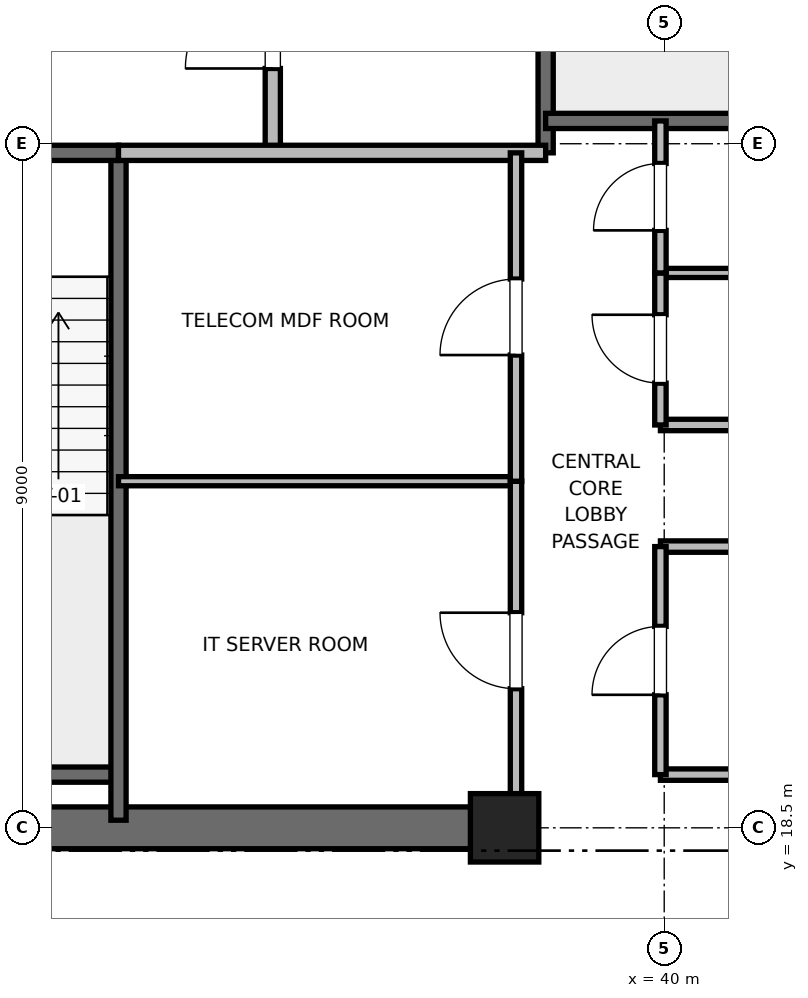
"""IFC4 building model, lengths in metres.
Left out: names, types, materials, properties, quantities, classifications, styles, units other than length and angle.
Written with IfcOpenShell. Run it as: python <this file> out.ifc"""

import sys

from ifc_helpers import new_model, si_unit, direction, frame, frame_2d, origin, origin_2d, place, context, subcontext, project, spatial, rectangle, extrude, element, fill, save


model = new_model("IFC4")
c1 = context("Model", 3, precision=1e-05, world=origin(), true_north=direction((0.0, 1.0)))
c2 = subcontext(c1, "Body", "Model", "MODEL_VIEW")
j1 = project(units=[si_unit("LENGTHUNIT", "METRE"), si_unit("PLANEANGLEUNIT", "RADIAN")], contexts=[c1])
p1 = place(None, origin())
s1 = spatial("IfcSite", under=j1, at=p1, CompositionType="ELEMENT")
p2 = place(p1, origin())
s2 = spatial("IfcBuilding", under=s1, at=p2, CompositionType="ELEMENT")
p3 = place(p2, frame((0.0, 0.0, 205.2)))
s3 = spatial("IfcBuildingStorey", under=s2, at=p3, CompositionType="ELEMENT", Elevation=205.2)
p4 = place(p3, frame((37.9, 18.5, 0.0), z_axis=(0.0, 0.0, 1.0), x_axis=(1.0, 0.0, 0.0)))
e1 = element("IfcColumn", 1, at=p4, inside=s3, PredefinedType="PILASTER", context=c2, shape_type="SweptSolid", body=[
    extrude(rectangle(XDim=0.9, YDim=0.9, at=origin_2d()), origin(), (0.0, 0.0, 1.0), 4.0),
])
p5 = place(p3, frame((29.0, 18.5, 0.0), z_axis=(0.0, 0.0, 1.0), x_axis=(1.0, 0.0, 0.0)))
e2 = element("IfcWall", 2, at=p5, inside=s3, PredefinedType="SHEAR", context=c2, shape_type="SweptSolid", body=[
    extrude(rectangle(XDim=9.2, YDim=0.55, at=frame_2d((4.6, 0.0))), origin(), (0.0, 0.0, 1.0), 3.775),
])
p6 = place(p3, frame((29.7, 19.2, 0.0), z_axis=(0.0, 0.0, 1.0), x_axis=(1.0, 0.0, 0.0)))
e3 = element("IfcWall", 3, at=p6, inside=s3, PredefinedType="SOLIDWALL", context=c2, shape_type="SweptSolid", body=[
    extrude(rectangle(XDim=3.12, YDim=0.2, at=frame_2d((1.56, 0.0))), origin(), (0.0, 0.0, 1.0), 3.775),
])
p7 = place(p3, frame((32.82, 18.6, 0.0), z_axis=(0.0, 0.0, 1.0), x_axis=(0.0, 1.0, 0.0)))
e4 = element("IfcWall", 4, at=p7, inside=s3, PredefinedType="SOLIDWALL", context=c2, shape_type="SweptSolid", body=[
    extrude(rectangle(XDim=8.78, YDim=0.2, at=frame_2d((4.39, 0.0))), origin(), (0.0, 0.0, 1.0), 3.775),
])
p8 = place(p3, frame((29.7, 27.38, 0.0), z_axis=(0.0, 0.0, 1.0), x_axis=(1.0, 0.0, 0.0)))
e5 = element("IfcWall", 5, at=p8, inside=s3, PredefinedType="SOLIDWALL", context=c2, shape_type="SweptSolid", body=[
    extrude(rectangle(XDim=3.12, YDim=0.2, at=frame_2d((1.56, 0.0))), origin(), (0.0, 0.0, 1.0), 3.775),
])
p9 = place(p8, frame((1.01, 0.0, 0.0)))
e6 = element("IfcOpeningElement", 6, at=p9, cuts=e5, PredefinedType="OPENING", context=c2, shape_type="SweptSolid", body=[
    extrude(rectangle(XDim=1.1, YDim=2.15, at=frame_2d((0.55, 1.075))), frame((0.0, 0.1, 0.0), z_axis=(0.0, -1.0, 0.0), x_axis=(1.0, 0.0, 0.0)), (0.0, 0.0, 1.0), 0.2),
])
p10 = place(p3, frame((38.44, 27.38, 0.0), z_axis=(0.0, 0.0, 1.0), x_axis=(0.0, 1.0, 0.0)))
e7 = element("IfcWall", 7, at=p10, inside=s3, PredefinedType="SOLIDWALL", context=c2, shape_type="SweptSolid", body=[
    extrude(rectangle(XDim=8.87, YDim=0.2, at=frame_2d((4.435, 0.0))), origin(), (0.0, 0.0, 1.0), 3.775),
])
p11 = place(p3, frame((38.44, 27.8, 0.0), z_axis=(0.0, 0.0, 1.0), x_axis=(1.0, 0.0, 0.0)))
e8 = element("IfcWall", 8, at=p11, inside=s3, PredefinedType="SOLIDWALL", context=c2, shape_type="SweptSolid", body=[
    extrude(rectangle(XDim=3.32, YDim=0.2, at=frame_2d((1.66, 0.0))), origin(), (0.0, 0.0, 1.0), 3.775),
])
p12 = place(p3, frame((34.85, 27.38, 0.0), z_axis=(0.0, 0.0, 1.0), x_axis=(0.0, 1.0, 0.0)))
e9 = element("IfcWall", 9, at=p12, inside=s3, PredefinedType="PARTITIONING", context=c2, shape_type="SweptSolid", body=[
    extrude(rectangle(XDim=3.37, YDim=0.2, at=frame_2d((1.685, 0.0))), origin(), (0.0, 0.0, 1.0), 3.775),
])
p13 = place(p12, frame((1.11, 0.0, 0.0)))
e10 = element("IfcOpeningElement", 10, at=p13, cuts=e9, PredefinedType="OPENING", context=c2, shape_type="SweptSolid", body=[
    extrude(rectangle(XDim=1.15, YDim=2.2, at=frame_2d((0.575, 1.1))), frame((0.0, 0.1, 0.0), z_axis=(0.0, -1.0, 0.0), x_axis=(1.0, 0.0, 0.0)), (0.0, 0.0, 1.0), 0.2),
])
p14 = place(p3, frame((32.82, 27.38, 0.0), z_axis=(0.0, 0.0, 1.0), x_axis=(1.0, 0.0, 0.0)))
e11 = element("IfcWall", 11, at=p14, inside=s3, PredefinedType="PARTITIONING", context=c2, shape_type="SweptSolid", body=[
    extrude(rectangle(XDim=5.62, YDim=0.2, at=frame_2d((2.81, 0.0))), origin(), (0.0, 0.0, 1.0), 3.775),
])
for number, where, z_axis, x_axis in (
    (12, (39.95, 19.2, 0.0), (0.0, 0.0, 1.0), (1.0, 0.0, 0.0)),
    (13, (39.95, 22.2, 0.0), (0.0, 0.0, 1.0), (1.0, 0.0, 0.0)),
    (14, (39.95, 23.8, 0.0), (0.0, 0.0, 1.0), (1.0, 0.0, 0.0)),
):
    element("IfcWall", number, at=place(p3, frame(where, z_axis=z_axis, x_axis=x_axis)), inside=s3, PredefinedType="PARTITIONING", context=c2, shape_type="SweptSolid", body=[
        extrude(rectangle(XDim=1.81, YDim=0.15, at=frame_2d((0.905, 0.0))), origin(), (0.0, 0.0, 1.0), 2.85),
    ])
p15 = place(p3, frame((39.95, 25.8, 0.0), z_axis=(0.0, 0.0, 1.0), x_axis=(1.0, 0.0, 0.0)))
e15 = element("IfcWall", 15, at=p15, inside=s3, PredefinedType="PARTITIONING", context=c2, shape_type="SweptSolid", body=[
    extrude(rectangle(XDim=1.81, YDim=0.12, at=frame_2d((0.905, 0.0))), origin(), (0.0, 0.0, 1.0), 2.85),
])
p16 = place(p3, frame((39.95, 19.2, 0.0), z_axis=(0.0, 0.0, 1.0), x_axis=(0.0, 1.0, 0.0)))
e16 = element("IfcWall", 16, at=p16, inside=s3, PredefinedType="PARTITIONING", context=c2, shape_type="SweptSolid", body=[
    extrude(rectangle(XDim=3.0, YDim=0.15, at=frame_2d((1.5, 0.0))), origin(), (0.0, 0.0, 1.0), 2.85),
])
p17 = place(p16, frame((1.05, 0.0, 0.0)))
e17 = element("IfcOpeningElement", 17, at=p17, cuts=e16, PredefinedType="OPENING", context=c2, shape_type="SweptSolid", body=[
    extrude(rectangle(XDim=0.9, YDim=2.1, at=frame_2d((0.45, 1.05))), frame((0.0, 0.075, 0.0), z_axis=(0.0, -1.0, 0.0), x_axis=(1.0, 0.0, 0.0)), (0.0, 0.0, 1.0), 0.15),
])
p18 = place(p3, frame((39.95, 23.8, 0.0), z_axis=(0.0, 0.0, 1.0), x_axis=(0.0, 1.0, 0.0)))
e18 = element("IfcWall", 18, at=p18, inside=s3, PredefinedType="PARTITIONING", context=c2, shape_type="SweptSolid", body=[
    extrude(rectangle(XDim=2.0, YDim=0.15, at=frame_2d((1.0, 0.0))), origin(), (0.0, 0.0, 1.0), 2.85),
])
p19 = place(p18, frame((0.55, 0.0, 0.0)))
e19 = element("IfcOpeningElement", 19, at=p19, cuts=e18, PredefinedType="OPENING", context=c2, shape_type="SweptSolid", body=[
    extrude(rectangle(XDim=0.9, YDim=2.1, at=frame_2d((0.45, 1.05))), frame((0.0, 0.075, 0.0), z_axis=(0.0, -1.0, 0.0), x_axis=(1.0, 0.0, 0.0)), (0.0, 0.0, 1.0), 0.15),
])
p20 = place(p3, frame((39.95, 25.8, 0.0), z_axis=(0.0, 0.0, 1.0), x_axis=(0.0, 1.0, 0.0)))
e20 = element("IfcWall", 20, at=p20, inside=s3, PredefinedType="PARTITIONING", context=c2, shape_type="SweptSolid", body=[
    extrude(rectangle(XDim=2.0, YDim=0.15, at=frame_2d((1.0, 0.0))), origin(), (0.0, 0.0, 1.0), 2.85),
])
p21 = place(p20, frame((0.56, 0.0, 0.0)))
e21 = element("IfcOpeningElement", 21, at=p21, cuts=e20, PredefinedType="OPENING", context=c2, shape_type="SweptSolid", body=[
    extrude(rectangle(XDim=0.88, YDim=2.1, at=frame_2d((0.44, 1.05))), frame((0.0, 0.075, 0.0), z_axis=(0.0, -1.0, 0.0), x_axis=(1.0, 0.0, 0.0)), (0.0, 0.0, 1.0), 0.15),
])
p22 = place(p3, frame((32.82, 23.06, 0.0), z_axis=(0.0, 0.0, 1.0), x_axis=(1.0, 0.0, 0.0)))
e22 = element("IfcWall", 22, at=p22, inside=s3, PredefinedType="PARTITIONING", context=c2, shape_type="SweptSolid", body=[
    extrude(rectangle(XDim=5.23, YDim=0.12, at=frame_2d((2.615, 0.0))), origin(), (0.0, 0.0, 1.0), 2.85),
])
p23 = place(p3, frame((38.05, 18.6, 0.0), z_axis=(0.0, 0.0, 1.0), x_axis=(0.0, 1.0, 0.0)))
e23 = element("IfcWall", 23, at=p23, inside=s3, PredefinedType="PARTITIONING", context=c2, shape_type="SweptSolid", body=[
    extrude(rectangle(XDim=4.46, YDim=0.15, at=frame_2d((2.23, 0.0))), origin(), (0.0, 0.0, 1.0), 2.755),
])
p24 = place(p23, frame((1.73, 0.0, 0.0)))
e24 = element("IfcOpeningElement", 24, at=p24, cuts=e23, PredefinedType="OPENING", context=c2, shape_type="SweptSolid", body=[
    extrude(rectangle(XDim=1.0, YDim=2.15, at=frame_2d((0.5, 1.075))), frame((0.0, 0.075, 0.0), z_axis=(0.0, -1.0, 0.0), x_axis=(1.0, 0.0, 0.0)), (0.0, 0.0, 1.0), 0.15),
])
p25 = place(p3, frame((38.05, 23.06, 0.0), z_axis=(0.0, 0.0, 1.0), x_axis=(0.0, 1.0, 0.0)))
e25 = element("IfcWall", 25, at=p25, inside=s3, PredefinedType="PARTITIONING", context=c2, shape_type="SweptSolid", body=[
    extrude(rectangle(XDim=4.32, YDim=0.15, at=frame_2d((2.16, 0.0))), origin(), (0.0, 0.0, 1.0), 2.85),
])
p26 = place(p25, frame((1.66, 0.0, 0.0)))
e26 = element("IfcOpeningElement", 26, at=p26, cuts=e25, PredefinedType="OPENING", context=c2, shape_type="SweptSolid", body=[
    extrude(rectangle(XDim=1.0, YDim=2.15, at=frame_2d((0.5, 1.075))), frame((0.0, 0.075, 0.0), z_axis=(0.0, -1.0, 0.0), x_axis=(1.0, 0.0, 0.0)), (0.0, 0.0, 1.0), 0.15),
])
p27 = place(p13, origin())
e27 = element("IfcDoor", 27, at=p27, inside=s3, OperationType="SINGLE_SWING_LEFT", PredefinedType="DOOR", context=c2, shape_type="SweptSolid", body=[
    extrude(rectangle(XDim=1.15, YDim=2.2, at=frame_2d((0.575, 1.1))), frame((0.0, 0.025, 0.0), z_axis=(0.0, -1.0, 0.0), x_axis=(1.0, 0.0, 0.0)), (0.0, 0.0, 1.0), 0.05),
])
fill(e10, e27)
p28 = place(p17, origin())
e28 = element("IfcDoor", 28, at=p28, inside=s3, OperationType="SINGLE_SWING_LEFT", PredefinedType="DOOR", context=c2, shape_type="SweptSolid", body=[
    extrude(rectangle(XDim=0.9, YDim=2.1, at=frame_2d((0.45, 1.05))), frame((0.0, 0.025, 0.0), z_axis=(0.0, -1.0, 0.0), x_axis=(1.0, 0.0, 0.0)), (0.0, 0.0, 1.0), 0.05),
])
fill(e17, e28)
p29 = place(p19, origin())
e29 = element("IfcDoor", 29, at=p29, inside=s3, OperationType="SINGLE_SWING_RIGHT", PredefinedType="DOOR", context=c2, shape_type="SweptSolid", body=[
    extrude(rectangle(XDim=0.9, YDim=2.1, at=frame_2d((0.45, 1.05))), frame((0.0, 0.025, 0.0), z_axis=(0.0, -1.0, 0.0), x_axis=(1.0, 0.0, 0.0)), (0.0, 0.0, 1.0), 0.05),
])
fill(e19, e29)
p30 = place(p21, origin())
e30 = element("IfcDoor", 30, at=p30, inside=s3, OperationType="SINGLE_SWING_LEFT", PredefinedType="DOOR", context=c2, shape_type="SweptSolid", body=[
    extrude(rectangle(XDim=0.88, YDim=2.1, at=frame_2d((0.44, 1.05))), frame((0.0, 0.025, 0.0), z_axis=(0.0, -1.0, 0.0), x_axis=(1.0, 0.0, 0.0)), (0.0, 0.0, 1.0), 0.05),
])
fill(e21, e30)
p31 = place(p24, origin())
e31 = element("IfcDoor", 31, at=p31, inside=s3, OperationType="SINGLE_SWING_RIGHT", PredefinedType="DOOR", context=c2, shape_type="SweptSolid", body=[
    extrude(rectangle(XDim=1.0, YDim=2.15, at=frame_2d((0.5, 1.075))), frame((0.0, 0.025, 0.0), z_axis=(0.0, -1.0, 0.0), x_axis=(1.0, 0.0, 0.0)), (0.0, 0.0, 1.0), 0.05),
])
fill(e24, e31)
p32 = place(p26, origin())
e32 = element("IfcDoor", 32, at=p32, inside=s3, OperationType="SINGLE_SWING_LEFT", PredefinedType="DOOR", context=c2, shape_type="SweptSolid", body=[
    extrude(rectangle(XDim=1.0, YDim=2.15, at=frame_2d((0.5, 1.075))), frame((0.0, 0.025, 0.0), z_axis=(0.0, -1.0, 0.0), x_axis=(1.0, 0.0, 0.0)), (0.0, 0.0, 1.0), 0.05),
])
fill(e26, e32)
save(model, sys.argv[1])
